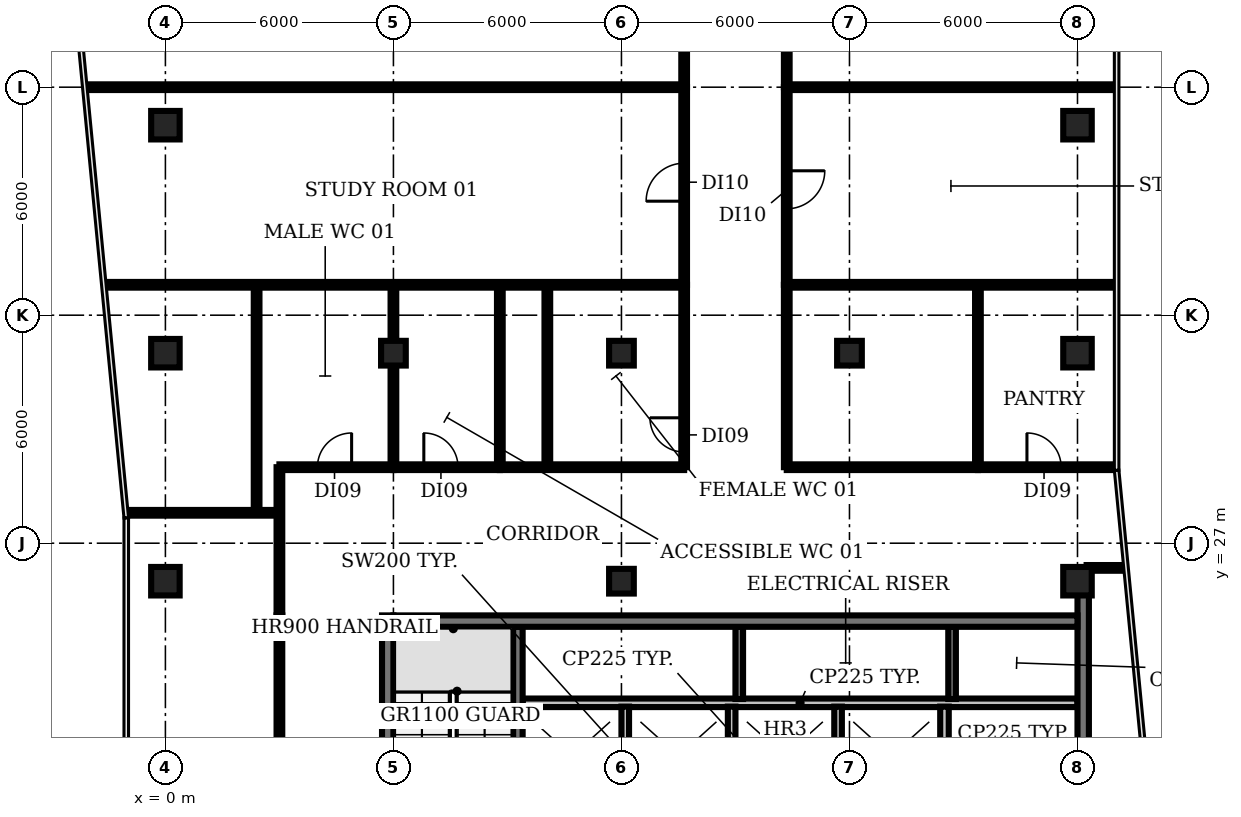
"""IFC4 building model, lengths in metres.
Left out: names, types, materials, properties, quantities, classifications, styles, units other than length and angle.
Written with IfcOpenShell. Run it as: python <this file> out.ifc"""

import sys

from ifc_helpers import new_model, si_unit, direction, frame, frame_2d, origin, origin_2d, place, context, subcontext, project, spatial, rectangle, extrude, element, fill, save


model = new_model("IFC4")
c1 = context("Model", 3, precision=1e-05, world=origin(), true_north=direction((0.0, 1.0)))
c2 = subcontext(c1, "Body", "Model", "MODEL_VIEW")
j1 = project(units=[si_unit("LENGTHUNIT", "METRE"), si_unit("PLANEANGLEUNIT", "RADIAN")], contexts=[c1])
p1 = place(None, origin())
s1 = spatial("IfcSite", under=j1, at=p1, CompositionType="ELEMENT")
p2 = place(p1, origin())
s2 = spatial("IfcBuilding", under=s1, at=p2, CompositionType="ELEMENT")
p3 = place(p2, frame((0.0, 0.0, 310.4)))
s3 = spatial("IfcBuildingStorey", under=s2, at=p3, CompositionType="ELEMENT", Elevation=310.4)
for number, where, z_axis, x_axis in (
    (1, (0.0, 26.0, 0.0), (0.0, 0.0, 1.0), (1.0, 0.0, 0.0)),
    (2, (0.0, 32.0, 0.0), (0.0, 0.0, 1.0), (1.0, 0.0, 0.0)),
    (3, (0.0, 38.0, 0.0), (0.0, 0.0, 1.0), (1.0, 0.0, 0.0)),
):
    element("IfcColumn", number, at=place(p3, frame(where, z_axis=z_axis, x_axis=x_axis)), inside=s3, PredefinedType="COLUMN", context=c2, shape_type="SweptSolid", body=[
        extrude(rectangle(XDim=0.75, YDim=0.75, at=origin_2d()), origin(), (0.0, 0.0, 1.0), 3.9),
    ])
for number, where, z_axis, x_axis in (
    (4, (6.0, 32.0, 0.0), (0.0, 0.0, 1.0), (1.0, 0.0, 0.0)),
    (5, (12.0, 26.0, 0.0), (0.0, 0.0, 1.0), (1.0, 0.0, 0.0)),
    (6, (12.0, 32.0, 0.0), (0.0, 0.0, 1.0), (1.0, 0.0, 0.0)),
    (7, (18.0, 32.0, 0.0), (0.0, 0.0, 1.0), (1.0, 0.0, 0.0)),
):
    element("IfcColumn", number, at=place(p3, frame(where, z_axis=z_axis, x_axis=x_axis)), inside=s3, PredefinedType="COLUMN", context=c2, shape_type="SweptSolid", body=[
        extrude(rectangle(XDim=0.65, YDim=0.65, at=origin_2d()), origin(), (0.0, 0.0, 1.0), 3.9),
    ])
for number, where, z_axis, x_axis in (
    (8, (24.0, 26.0, 0.0), (0.0, 0.0, 1.0), (1.0, 0.0, 0.0)),
    (9, (24.0, 32.0, 0.0), (0.0, 0.0, 1.0), (1.0, 0.0, 0.0)),
    (10, (24.0, 38.0, 0.0), (0.0, 0.0, 1.0), (1.0, 0.0, 0.0)),
):
    element("IfcColumn", number, at=place(p3, frame(where, z_axis=z_axis, x_axis=x_axis)), inside=s3, PredefinedType="COLUMN", context=c2, shape_type="SweptSolid", body=[
        extrude(rectangle(XDim=0.75, YDim=0.75, at=origin_2d()), origin(), (0.0, 0.0, 1.0), 3.9),
    ])
p4 = place(p3, frame((9.4, 22.8, 0.0), z_axis=(0.0, 0.0, 1.0), x_axis=(1.0, 0.0, 0.0)))
e11 = element("IfcWall", 11, at=p4, inside=s3, PredefinedType="PARTITIONING", context=c2, shape_type="SweptSolid", body=[
    extrude(rectangle(XDim=14.6, YDim=0.225, at=frame_2d((7.3, 0.0))), origin(), (0.0, 0.0, 1.0), 3.9),
])
p5 = place(p3, frame((9.275, 18.375, 0.0), z_axis=(0.0, 0.0, 1.0), x_axis=(0.0, 1.0, 0.0)))
e12 = element("IfcWall", 12, at=p5, inside=s3, PredefinedType="SHEAR", context=c2, shape_type="SweptSolid", body=[
    extrude(rectangle(XDim=6.425, YDim=0.25, at=frame_2d((3.212, 0.0))), origin(), (0.0, 0.0, 1.0), 3.9),
])
for number, where, z_axis, x_axis in (
    (13, (12.1, 20.1, 0.0), (0.0, 0.0, 1.0), (0.0, 1.0, 0.0)),
    (14, (14.9, 20.1, 0.0), (0.0, 0.0, 1.0), (0.0, 1.0, 0.0)),
):
    element("IfcWall", number, at=place(p3, frame(where, z_axis=z_axis, x_axis=x_axis)), inside=s3, PredefinedType="SOLIDWALL", context=c2, shape_type="SweptSolid", body=[
        extrude(rectangle(XDim=2.6, YDim=0.2, at=frame_2d((1.3, 0.0))), origin(), (0.0, 0.0, 1.0), 3.9),
    ])
p6 = place(p3, frame((15.1, 22.9, 0.0), z_axis=(0.0, 0.0, 1.0), x_axis=(0.0, 1.0, 0.0)))
e15 = element("IfcWall", 15, at=p6, inside=s3, PredefinedType="SHEAR", context=c2, shape_type="SweptSolid", body=[
    extrude(rectangle(XDim=1.9, YDim=0.2, at=frame_2d((0.95, 0.0))), origin(), (0.0, 0.0, 1.0), 3.9),
])
p7 = place(p3, frame((17.7, 20.1, 0.0), z_axis=(0.0, 0.0, 1.0), x_axis=(0.0, 1.0, 0.0)))
e16 = element("IfcWall", 16, at=p7, inside=s3, PredefinedType="SOLIDWALL", context=c2, shape_type="SweptSolid", body=[
    extrude(rectangle(XDim=2.6, YDim=0.2, at=frame_2d((1.3, 0.0))), origin(), (0.0, 0.0, 1.0), 3.9),
])
p8 = place(p3, frame((20.5, 20.1, 0.0), z_axis=(0.0, 0.0, 1.0), x_axis=(0.0, 1.0, 0.0)))
e17 = element("IfcWall", 17, at=p8, inside=s3, PredefinedType="PARTITIONING", context=c2, shape_type="SweptSolid", body=[
    extrude(rectangle(XDim=2.6, YDim=0.225, at=frame_2d((1.3, 0.0))), origin(), (0.0, 0.0, 1.0), 3.9),
])
p9 = place(p3, frame((20.7, 22.9, 0.0), z_axis=(0.0, 0.0, 1.0), x_axis=(0.0, 1.0, 0.0)))
e18 = element("IfcWall", 18, at=p9, inside=s3, PredefinedType="SHEAR", context=c2, shape_type="SweptSolid", body=[
    extrude(rectangle(XDim=1.9, YDim=0.2, at=frame_2d((0.95, 0.0))), origin(), (0.0, 0.0, 1.0), 3.9),
])
p10 = place(p3, frame((5.85, 5.1, 0.0), z_axis=(0.0, 0.0, 1.0), x_axis=(0.0, 1.0, 0.0)))
e19 = element("IfcWall", 19, at=p10, inside=s3, PredefinedType="SHEAR", context=c2, shape_type="SweptSolid", body=[
    extrude(rectangle(XDim=20.0, YDim=0.3, at=frame_2d((10.0, 0.0))), origin(), (0.0, 0.0, 1.0), 3.9),
])
p11 = place(p10, frame((0.55, 0.0, 0.0)))
e20 = element("IfcOpeningElement", 20, at=p11, cuts=e19, PredefinedType="OPENING", context=c2, shape_type="SweptSolid", body=[
    extrude(rectangle(XDim=1.5, YDim=2.1, at=frame_2d((0.75, 1.05))), frame((0.0, 0.16, 0.0), z_axis=(0.0, -1.0, 0.0), x_axis=(1.0, 0.0, 0.0)), (0.0, 0.0, 1.0), 0.32),
])
p12 = place(p10, frame((7.0, 0.0, 0.0)))
e21 = element("IfcOpeningElement", 21, at=p12, cuts=e19, PredefinedType="OPENING", context=c2, shape_type="SweptSolid", body=[
    extrude(rectangle(XDim=1.2, YDim=2.1, at=frame_2d((0.6, 1.05))), frame((0.0, 0.16, 0.0), z_axis=(0.0, -1.0, 0.0), x_axis=(1.0, 0.0, 0.0)), (0.0, 0.0, 1.0), 0.32),
])
p13 = place(p10, frame((13.55, 0.0, 0.0)))
e22 = element("IfcOpeningElement", 22, at=p13, cuts=e19, PredefinedType="OPENING", context=c2, shape_type="SweptSolid", body=[
    extrude(rectangle(XDim=1.2, YDim=2.1, at=frame_2d((0.6, 1.05))), frame((0.0, 0.16, 0.0), z_axis=(0.0, -1.0, 0.0), x_axis=(1.0, 0.0, 0.0)), (0.0, 0.0, 1.0), 0.32),
])
p14 = place(p3, frame((24.15, 25.655, 0.0), z_axis=(0.0, 0.0, 1.0), x_axis=(0.0, -1.0, 0.0)))
e23 = element("IfcWall", 23, at=p14, inside=s3, PredefinedType="SHEAR", context=c2, shape_type="SweptSolid", body=[
    extrude(rectangle(XDim=20.555, YDim=0.3, at=frame_2d((10.277, 0.0))), origin(), (0.0, 0.0, 1.0), 3.9),
])
p15 = place(p14, frame((18.505, 0.0, 0.0)))
e24 = element("IfcOpeningElement", 24, at=p15, cuts=e23, PredefinedType="OPENING", context=c2, shape_type="SweptSolid", body=[
    extrude(rectangle(XDim=1.5, YDim=2.1, at=frame_2d((0.75, 1.05))), frame((0.0, 0.16, 0.0), z_axis=(0.0, -1.0, 0.0), x_axis=(1.0, 0.0, 0.0)), (0.0, 0.0, 1.0), 0.32),
])
p16 = place(p14, frame((12.405, 0.0, 0.0)))
e25 = element("IfcOpeningElement", 25, at=p16, cuts=e23, PredefinedType="OPENING", context=c2, shape_type="SweptSolid", body=[
    extrude(rectangle(XDim=0.9, YDim=2.1, at=frame_2d((0.45, 1.05))), frame((0.0, 0.16, 0.0), z_axis=(0.0, -1.0, 0.0), x_axis=(1.0, 0.0, 0.0)), (0.0, 0.0, 1.0), 0.32),
])
p17 = place(p14, frame((6.405, 0.0, 0.0)))
e26 = element("IfcOpeningElement", 26, at=p17, cuts=e23, PredefinedType="OPENING", context=c2, shape_type="SweptSolid", body=[
    extrude(rectangle(XDim=2.0, YDim=2.1, at=frame_2d((1.0, 1.05))), frame((0.0, 0.16, 0.0), z_axis=(0.0, -1.0, 0.0), x_axis=(1.0, 0.0, 0.0)), (0.0, 0.0, 1.0), 0.32),
])
p18 = place(p3, frame((6.0, 24.95, 0.0), z_axis=(0.0, 0.0, 1.0), x_axis=(1.0, 0.0, 0.0)))
e27 = element("IfcWall", 27, at=p18, inside=s3, PredefinedType="SHEAR", context=c2, shape_type="SweptSolid", body=[
    extrude(rectangle(XDim=18.0, YDim=0.3, at=frame_2d((9.0, 0.0))), origin(), (0.0, 0.0, 1.0), 3.9),
])
p19 = place(p3, frame((-2.049, 39.0, 0.0), z_axis=(0.0, 0.0, 1.0), x_axis=(1.0, 0.0, 0.0)))
e28 = element("IfcWall", 28, at=p19, inside=s3, PredefinedType="PARTITIONING", context=c2, shape_type="SweptSolid", body=[
    extrude(rectangle(XDim=15.698, YDim=0.15, at=frame_2d((7.849, 0.0))), origin(), (0.0, 0.0, 1.0), 2.48),
])
p20 = place(p3, frame((-1.57, 33.8, 0.0), z_axis=(0.0, 0.0, 1.0), x_axis=(1.0, 0.0, 0.0)))
e29 = element("IfcWall", 29, at=p20, inside=s3, PredefinedType="PARTITIONING", context=c2, shape_type="SweptSolid", body=[
    extrude(rectangle(XDim=15.22, YDim=0.15, at=frame_2d((7.61, 0.0))), origin(), (0.0, 0.0, 1.0), 2.48),
])
p21 = place(p3, frame((-0.968, 27.8, 0.0), z_axis=(0.0, 0.0, 1.0), x_axis=(1.0, 0.0, 0.0)))
e30 = element("IfcWall", 30, at=p21, inside=s3, PredefinedType="PARTITIONING", context=c2, shape_type="SweptSolid", body=[
    extrude(rectangle(XDim=3.968, YDim=0.15, at=frame_2d((1.984, 0.0))), origin(), (0.0, 0.0, 1.0), 2.48),
])
p22 = place(p3, frame((2.4, 27.8, 0.0), z_axis=(0.0, 0.0, 1.0), x_axis=(0.0, 1.0, 0.0)))
e31 = element("IfcWall", 31, at=p22, inside=s3, PredefinedType="PARTITIONING", context=c2, shape_type="SweptSolid", body=[
    extrude(rectangle(XDim=6.0, YDim=0.15, at=frame_2d((3.0, 0.0))), origin(), (0.0, 0.0, 1.0), 2.48),
])
p23 = place(p3, frame((3.0, 5.1, 0.0), z_axis=(0.0, 0.0, 1.0), x_axis=(0.0, 1.0, 0.0)))
e32 = element("IfcWall", 32, at=p23, inside=s3, PredefinedType="PARTITIONING", context=c2, shape_type="SweptSolid", body=[
    extrude(rectangle(XDim=20.0, YDim=0.15, at=frame_2d((10.0, 0.0))), origin(), (0.0, 0.0, 1.0), 2.48),
])
p24 = place(p23, frame((9.3, 0.0, 0.0)))
e33 = element("IfcOpeningElement", 33, at=p24, cuts=e32, PredefinedType="OPENING", context=c2, shape_type="SweptSolid", body=[
    extrude(rectangle(XDim=1.2, YDim=2.1, at=frame_2d((0.6, 1.05))), frame((0.0, 0.085, 0.0), z_axis=(0.0, -1.0, 0.0), x_axis=(1.0, 0.0, 0.0)), (0.0, 0.0, 1.0), 0.17),
])
p25 = place(p3, frame((3.0, 25.1, 0.0), z_axis=(0.0, 0.0, 1.0), x_axis=(0.0, 1.0, 0.0)))
e34 = element("IfcWall", 34, at=p25, inside=s3, PredefinedType="PARTITIONING", context=c2, shape_type="SweptSolid", body=[
    extrude(rectangle(XDim=3.9, YDim=0.15, at=frame_2d((1.95, 0.0))), origin(), (0.0, 0.0, 1.0), 2.48),
])
p26 = place(p3, frame((3.0, 29.0, 0.0), z_axis=(0.0, 0.0, 1.0), x_axis=(1.0, 0.0, 0.0)))
e35 = element("IfcWall", 35, at=p26, inside=s3, PredefinedType="PARTITIONING", context=c2, shape_type="SweptSolid", body=[
    extrude(rectangle(XDim=3.0, YDim=0.15, at=frame_2d((1.5, 0.0))), origin(), (0.0, 0.0, 1.0), 2.48),
])
p27 = place(p26, frame((1.0, 0.0, 0.0)))
e36 = element("IfcOpeningElement", 36, at=p27, cuts=e35, PredefinedType="OPENING", context=c2, shape_type="SweptSolid", body=[
    extrude(rectangle(XDim=0.9, YDim=2.1, at=frame_2d((0.45, 1.05))), frame((0.0, 0.085, 0.0), z_axis=(0.0, -1.0, 0.0), x_axis=(1.0, 0.0, 0.0)), (0.0, 0.0, 1.0), 0.17),
])
p28 = place(p3, frame((6.0, 29.0, 0.0), z_axis=(0.0, 0.0, 1.0), x_axis=(0.0, 1.0, 0.0)))
e37 = element("IfcWall", 37, at=p28, inside=s3, PredefinedType="PARTITIONING", context=c2, shape_type="SweptSolid", body=[
    extrude(rectangle(XDim=4.8, YDim=0.15, at=frame_2d((2.4, 0.0))), origin(), (0.0, 0.0, 1.0), 2.48),
])
p29 = place(p3, frame((6.0, 29.0, 0.0), z_axis=(0.0, 0.0, 1.0), x_axis=(1.0, 0.0, 0.0)))
e38 = element("IfcWall", 38, at=p29, inside=s3, PredefinedType="PARTITIONING", context=c2, shape_type="SweptSolid", body=[
    extrude(rectangle(XDim=2.8, YDim=0.15, at=frame_2d((1.4, 0.0))), origin(), (0.0, 0.0, 1.0), 2.48),
])
p30 = place(p29, frame((0.8, 0.0, 0.0)))
e39 = element("IfcOpeningElement", 39, at=p30, cuts=e38, PredefinedType="OPENING", context=c2, shape_type="SweptSolid", body=[
    extrude(rectangle(XDim=0.9, YDim=2.1, at=frame_2d((0.45, 1.05))), frame((0.0, 0.085, 0.0), z_axis=(0.0, -1.0, 0.0), x_axis=(1.0, 0.0, 0.0)), (0.0, 0.0, 1.0), 0.17),
])
p31 = place(p3, frame((8.8, 29.0, 0.0), z_axis=(0.0, 0.0, 1.0), x_axis=(0.0, 1.0, 0.0)))
e40 = element("IfcWall", 40, at=p31, inside=s3, PredefinedType="PARTITIONING", context=c2, shape_type="SweptSolid", body=[
    extrude(rectangle(XDim=4.8, YDim=0.15, at=frame_2d((2.4, 0.0))), origin(), (0.0, 0.0, 1.0), 2.48),
])
p32 = place(p3, frame((8.8, 29.0, 0.0), z_axis=(0.0, 0.0, 1.0), x_axis=(1.0, 0.0, 0.0)))
e41 = element("IfcWall", 41, at=p32, inside=s3, PredefinedType="PARTITIONING", context=c2, shape_type="SweptSolid", body=[
    extrude(rectangle(XDim=4.85, YDim=0.15, at=frame_2d((2.425, 0.0))), origin(), (0.0, 0.0, 1.0), 2.48),
])
p33 = place(p3, frame((10.05, 29.0, 0.0), z_axis=(0.0, 0.0, 1.0), x_axis=(0.0, 1.0, 0.0)))
e42 = element("IfcWall", 42, at=p33, inside=s3, PredefinedType="PARTITIONING", context=c2, shape_type="SweptSolid", body=[
    extrude(rectangle(XDim=4.8, YDim=0.15, at=frame_2d((2.4, 0.0))), origin(), (0.0, 0.0, 1.0), 2.48),
])
p34 = place(p3, frame((13.65, 29.0, 0.0), z_axis=(0.0, 0.0, 1.0), x_axis=(0.0, 1.0, 0.0)))
e43 = element("IfcWall", 43, at=p34, inside=s3, PredefinedType="PARTITIONING", context=c2, shape_type="SweptSolid", body=[
    extrude(rectangle(XDim=4.8, YDim=0.15, at=frame_2d((2.4, 0.0))), origin(), (0.0, 0.0, 1.0), 2.48),
])
p35 = place(p34, frame((0.4, 0.0, 0.0)))
e44 = element("IfcOpeningElement", 44, at=p35, cuts=e43, PredefinedType="OPENING", context=c2, shape_type="SweptSolid", body=[
    extrude(rectangle(XDim=0.9, YDim=2.1, at=frame_2d((0.45, 1.05))), frame((0.0, 0.085, 0.0), z_axis=(0.0, -1.0, 0.0), x_axis=(1.0, 0.0, 0.0)), (0.0, 0.0, 1.0), 0.17),
])
p36 = place(p3, frame((13.65, 33.8, 0.0), z_axis=(0.0, 0.0, 1.0), x_axis=(0.0, 1.0, 0.0)))
e45 = element("IfcWall", 45, at=p36, inside=s3, PredefinedType="PARTITIONING", context=c2, shape_type="SweptSolid", body=[
    extrude(rectangle(XDim=5.2, YDim=0.15, at=frame_2d((2.6, 0.0))), origin(), (0.0, 0.0, 1.0), 2.48),
])
p37 = place(p36, frame((2.2, 0.0, 0.0)))
e46 = element("IfcOpeningElement", 46, at=p37, cuts=e45, PredefinedType="OPENING", context=c2, shape_type="SweptSolid", body=[
    extrude(rectangle(XDim=1.0, YDim=2.1, at=frame_2d((0.5, 1.05))), frame((0.0, 0.085, 0.0), z_axis=(0.0, -1.0, 0.0), x_axis=(1.0, 0.0, 0.0)), (0.0, 0.0, 1.0), 0.17),
])
p38 = place(p3, frame((13.65, 39.0, 0.0), z_axis=(0.0, 0.0, 1.0), x_axis=(0.0, 1.0, 0.0)))
e47 = element("IfcWall", 47, at=p38, inside=s3, PredefinedType="PARTITIONING", context=c2, shape_type="SweptSolid", body=[
    extrude(rectangle(XDim=12.0, YDim=0.15, at=frame_2d((6.0, 0.0))), origin(), (0.0, 0.0, 1.0), 2.48),
])
p39 = place(p38, frame((5.5, 0.0, 0.0)))
e48 = element("IfcOpeningElement", 48, at=p39, cuts=e47, PredefinedType="OPENING", context=c2, shape_type="SweptSolid", body=[
    extrude(rectangle(XDim=1.2, YDim=2.1, at=frame_2d((0.6, 1.05))), frame((0.0, 0.085, 0.0), z_axis=(0.0, -1.0, 0.0), x_axis=(1.0, 0.0, 0.0)), (0.0, 0.0, 1.0), 0.17),
])
p40 = place(p3, frame((16.35, 29.0, 0.0), z_axis=(0.0, 0.0, 1.0), x_axis=(0.0, 1.0, 0.0)))
e49 = element("IfcWall", 49, at=p40, inside=s3, PredefinedType="PARTITIONING", context=c2, shape_type="SweptSolid", body=[
    extrude(rectangle(XDim=4.8, YDim=0.15, at=frame_2d((2.4, 0.0))), origin(), (0.0, 0.0, 1.0), 2.48),
])
p41 = place(p3, frame((16.35, 29.0, 0.0), z_axis=(0.0, 0.0, 1.0), x_axis=(1.0, 0.0, 0.0)))
e50 = element("IfcWall", 50, at=p41, inside=s3, PredefinedType="PARTITIONING", context=c2, shape_type="SweptSolid", body=[
    extrude(rectangle(XDim=5.03, YDim=0.15, at=frame_2d((2.515, 0.0))), origin(), (0.0, 0.0, 1.0), 2.48),
])
p42 = place(p3, frame((16.35, 33.8, 0.0), z_axis=(0.0, 0.0, 1.0), x_axis=(1.0, 0.0, 0.0)))
e51 = element("IfcWall", 51, at=p42, inside=s3, PredefinedType="PARTITIONING", context=c2, shape_type="SweptSolid", body=[
    extrude(rectangle(XDim=8.63, YDim=0.15, at=frame_2d((4.315, 0.0))), origin(), (0.0, 0.0, 1.0), 2.48),
])
p43 = place(p3, frame((16.35, 39.0, 0.0), z_axis=(0.0, 0.0, 1.0), x_axis=(0.0, -1.0, 0.0)))
e52 = element("IfcWall", 52, at=p43, inside=s3, PredefinedType="PARTITIONING", context=c2, shape_type="SweptSolid", body=[
    extrude(rectangle(XDim=5.2, YDim=0.15, at=frame_2d((2.6, 0.0))), origin(), (0.0, 0.0, 1.0), 2.48),
])
p44 = place(p43, frame((2.2, 0.0, 0.0)))
e53 = element("IfcOpeningElement", 53, at=p44, cuts=e52, PredefinedType="OPENING", context=c2, shape_type="SweptSolid", body=[
    extrude(rectangle(XDim=1.0, YDim=2.1, at=frame_2d((0.5, 1.05))), frame((0.0, 0.085, 0.0), z_axis=(0.0, -1.0, 0.0), x_axis=(1.0, 0.0, 0.0)), (0.0, 0.0, 1.0), 0.17),
])
p45 = place(p3, frame((16.35, 39.0, 0.0), z_axis=(0.0, 0.0, 1.0), x_axis=(1.0, 0.0, 0.0)))
e54 = element("IfcWall", 54, at=p45, inside=s3, PredefinedType="PARTITIONING", context=c2, shape_type="SweptSolid", body=[
    extrude(rectangle(XDim=8.63, YDim=0.15, at=frame_2d((4.315, 0.0))), origin(), (0.0, 0.0, 1.0), 2.48),
])
p46 = place(p3, frame((16.35, 45.0, 0.0), z_axis=(0.0, 0.0, 1.0), x_axis=(0.0, -1.0, 0.0)))
e55 = element("IfcWall", 55, at=p46, inside=s3, PredefinedType="PARTITIONING", context=c2, shape_type="SweptSolid", body=[
    extrude(rectangle(XDim=6.0, YDim=0.15, at=frame_2d((3.0, 0.0))), origin(), (0.0, 0.0, 1.0), 2.48),
])
p47 = place(p46, frame((3.3, 0.0, 0.0)))
e56 = element("IfcOpeningElement", 56, at=p47, cuts=e55, PredefinedType="OPENING", context=c2, shape_type="SweptSolid", body=[
    extrude(rectangle(XDim=1.0, YDim=2.1, at=frame_2d((0.5, 1.05))), frame((0.0, 0.085, 0.0), z_axis=(0.0, -1.0, 0.0), x_axis=(1.0, 0.0, 0.0)), (0.0, 0.0, 1.0), 0.17),
])
p48 = place(p3, frame((21.38, 29.0, 0.0), z_axis=(0.0, 0.0, 1.0), x_axis=(0.0, 1.0, 0.0)))
e57 = element("IfcWall", 57, at=p48, inside=s3, PredefinedType="PARTITIONING", context=c2, shape_type="SweptSolid", body=[
    extrude(rectangle(XDim=4.8, YDim=0.15, at=frame_2d((2.4, 0.0))), origin(), (0.0, 0.0, 1.0), 2.48),
])
p49 = place(p3, frame((21.38, 29.0, 0.0), z_axis=(0.0, 0.0, 1.0), x_axis=(1.0, 0.0, 0.0)))
e58 = element("IfcWall", 58, at=p49, inside=s3, PredefinedType="PARTITIONING", context=c2, shape_type="SweptSolid", body=[
    extrude(rectangle(XDim=3.585, YDim=0.15, at=frame_2d((1.792, 0.0))), origin(), (0.0, 0.0, 1.0), 2.48),
])
p50 = place(p49, frame((1.29, 0.0, 0.0)))
e59 = element("IfcOpeningElement", 59, at=p50, cuts=e58, PredefinedType="OPENING", context=c2, shape_type="SweptSolid", body=[
    extrude(rectangle(XDim=0.9, YDim=2.1, at=frame_2d((0.45, 1.05))), frame((0.0, 0.085, 0.0), z_axis=(0.0, -1.0, 0.0), x_axis=(1.0, 0.0, 0.0)), (0.0, 0.0, 1.0), 0.17),
])
p51 = place(p3, frame((24.24, 26.35, 0.0), z_axis=(0.0, 0.0, 1.0), x_axis=(1.0, 0.0, 0.0)))
e60 = element("IfcWall", 60, at=p51, inside=s3, PredefinedType="PARTITIONING", context=c2, shape_type="SweptSolid", body=[
    extrude(rectangle(XDim=0.977, YDim=0.15, at=frame_2d((0.489, 0.0))), origin(), (0.0, 0.0, 1.0), 2.48),
])
p52 = place(p27, origin())
e61 = element("IfcDoor", 61, at=p52, inside=s3, OperationType="SINGLE_SWING_RIGHT", PredefinedType="DOOR", context=c2, shape_type="SweptSolid", body=[
    extrude(rectangle(XDim=0.9, YDim=2.1, at=frame_2d((0.45, 1.05))), frame((0.0, 0.025, 0.0), z_axis=(0.0, -1.0, 0.0), x_axis=(1.0, 0.0, 0.0)), (0.0, 0.0, 1.0), 0.05),
])
fill(e36, e61)
p53 = place(p30, origin())
e62 = element("IfcDoor", 62, at=p53, inside=s3, OperationType="SINGLE_SWING_LEFT", PredefinedType="DOOR", context=c2, shape_type="SweptSolid", body=[
    extrude(rectangle(XDim=0.9, YDim=2.1, at=frame_2d((0.45, 1.05))), frame((0.0, 0.025, 0.0), z_axis=(0.0, -1.0, 0.0), x_axis=(1.0, 0.0, 0.0)), (0.0, 0.0, 1.0), 0.05),
])
fill(e39, e62)
p54 = place(p35, origin())
e63 = element("IfcDoor", 63, at=p54, inside=s3, OperationType="SINGLE_SWING_RIGHT", PredefinedType="DOOR", context=c2, shape_type="SweptSolid", body=[
    extrude(rectangle(XDim=0.9, YDim=2.1, at=frame_2d((0.45, 1.05))), frame((0.0, 0.025, 0.0), z_axis=(0.0, -1.0, 0.0), x_axis=(1.0, 0.0, 0.0)), (0.0, 0.0, 1.0), 0.05),
])
fill(e44, e63)
p55 = place(p37, origin())
e64 = element("IfcDoor", 64, at=p55, inside=s3, OperationType="SINGLE_SWING_LEFT", PredefinedType="DOOR", context=c2, shape_type="SweptSolid", body=[
    extrude(rectangle(XDim=1.0, YDim=2.1, at=frame_2d((0.5, 1.05))), frame((0.0, 0.025, 0.0), z_axis=(0.0, -1.0, 0.0), x_axis=(1.0, 0.0, 0.0)), (0.0, 0.0, 1.0), 0.05),
])
fill(e46, e64)
p56 = place(p44, origin())
e65 = element("IfcDoor", 65, at=p56, inside=s3, OperationType="SINGLE_SWING_LEFT", PredefinedType="DOOR", context=c2, shape_type="SweptSolid", body=[
    extrude(rectangle(XDim=1.0, YDim=2.1, at=frame_2d((0.5, 1.05))), frame((0.0, 0.025, 0.0), z_axis=(0.0, -1.0, 0.0), x_axis=(1.0, 0.0, 0.0)), (0.0, 0.0, 1.0), 0.05),
])
fill(e53, e65)
p57 = place(p50, origin())
e66 = element("IfcDoor", 66, at=p57, inside=s3, OperationType="SINGLE_SWING_LEFT", PredefinedType="DOOR", context=c2, shape_type="SweptSolid", body=[
    extrude(rectangle(XDim=0.9, YDim=2.1, at=frame_2d((0.45, 1.05))), frame((0.0, 0.025, 0.0), z_axis=(0.0, -1.0, 0.0), x_axis=(1.0, 0.0, 0.0)), (0.0, 0.0, 1.0), 0.05),
])
fill(e59, e66)
save(model, sys.argv[1])
